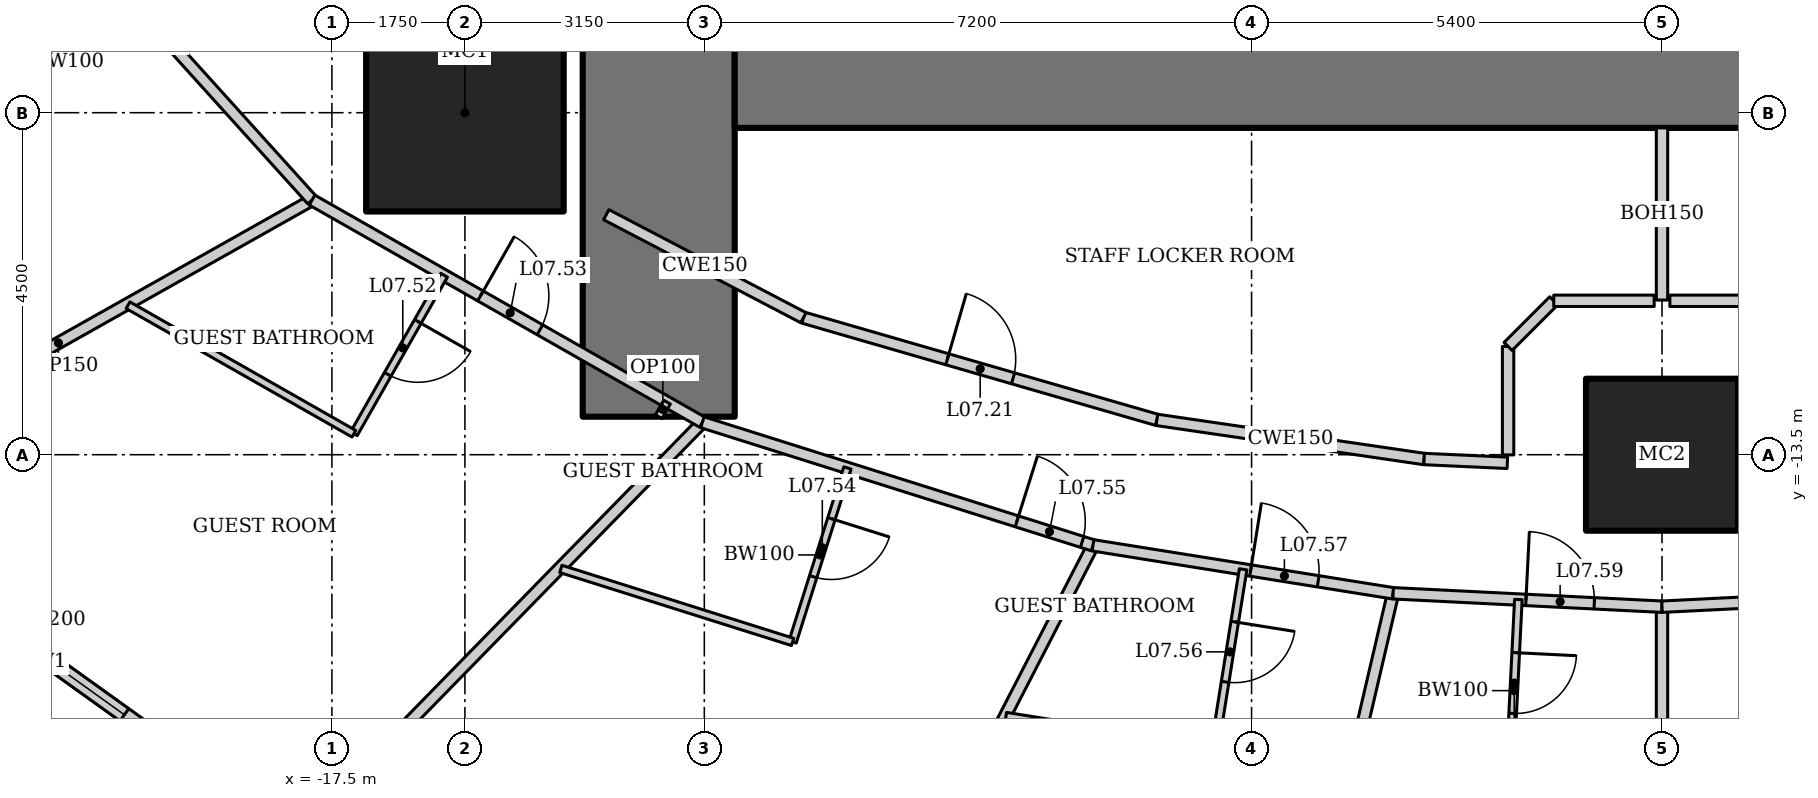
"""IFC4 building model, lengths in metres.
Left out: names, types, materials, properties, quantities, classifications, styles, units other than length and angle.
Written with IfcOpenShell. Run it as: python <this file> out.ifc"""

import sys

from ifc_helpers import new_model, si_unit, direction, frame, frame_2d, origin, origin_2d, place, context, subcontext, project, spatial, rectangle, hollow_rectangle, extrude, element, fill, save


model = new_model("IFC4")
c1 = context("Model", 3, precision=1e-05, world=origin(), true_north=direction((0.0, 1.0)))
c2 = subcontext(c1, "Body", "Model", "MODEL_VIEW")
j1 = project(units=[si_unit("LENGTHUNIT", "METRE"), si_unit("PLANEANGLEUNIT", "RADIAN")], contexts=[c1])
p1 = place(None, origin())
s1 = spatial("IfcSite", under=j1, at=p1, CompositionType="ELEMENT")
p2 = place(p1, origin())
s2 = spatial("IfcBuilding", under=s1, at=p2, CompositionType="ELEMENT")
p3 = place(p2, frame((0.0, 0.0, 40.6)))
s3 = spatial("IfcBuildingStorey", under=s2, at=p3, CompositionType="ELEMENT", Elevation=40.6)
p4 = place(p3, frame((-15.75, -9.0, 0.0), z_axis=(0.0, 0.0, 1.0), x_axis=(1.0, 0.0, 0.0)))
e1 = element("IfcColumn", 1, at=p4, inside=s3, PredefinedType="COLUMN", context=c2, shape_type="SweptSolid", body=[
    extrude(hollow_rectangle(XDim=2.6, YDim=2.6, WallThickness=0.13, at=origin_2d()), origin(), (0.0, 0.0, 1.0), 3.6),
])
p5 = place(p3, frame((0.0, -13.5, 0.0), z_axis=(0.0, 0.0, 1.0), x_axis=(1.0, 0.0, 0.0)))
e2 = element("IfcColumn", 2, at=p5, inside=s3, PredefinedType="COLUMN", context=c2, shape_type="SweptSolid", body=[
    extrude(hollow_rectangle(XDim=2.0, YDim=2.0, WallThickness=0.17, at=origin_2d()), origin(), (0.0, 0.0, 1.0), 3.6),
])
p6 = place(p3, frame((-13.2, 13.0, 0.0), z_axis=(0.0, 0.0, 1.0), x_axis=(0.0, -1.0, 0.0)))
e3 = element("IfcWall", 3, at=p6, inside=s3, PredefinedType="SHEAR", context=c2, shape_type="SweptSolid", body=[
    extrude(rectangle(XDim=26.0, YDim=2.0, at=frame_2d((13.0, 0.0))), origin(), (0.0, 0.0, 1.0), 3.6),
])
p7 = place(p6, frame((12.1, 0.0, 0.0)))
e4 = element("IfcOpeningElement", 4, at=p7, cuts=e3, PredefinedType="OPENING", context=c2, shape_type="SweptSolid", body=[
    extrude(rectangle(XDim=1.8, YDim=2.1, at=frame_2d((0.9, 1.05))), frame((0.0, 1.01, 0.0), z_axis=(0.0, -1.0, 0.0), x_axis=(1.0, 0.0, 0.0)), (0.0, 0.0, 1.0), 2.02),
])
p8 = place(p3, frame((-12.2, -8.0, 0.0), z_axis=(0.0, 0.0, 1.0), x_axis=(1.0, 0.0, 0.0)))
e5 = element("IfcWall", 5, at=p8, inside=s3, PredefinedType="SHEAR", context=c2, shape_type="SweptSolid", body=[
    extrude(rectangle(XDim=24.4, YDim=2.4, at=frame_2d((12.2, 0.0))), origin(), (0.0, 0.0, 1.0), 3.6),
])
p9 = place(p3, frame((-24.482, -13.875, 0.0), z_axis=(0.0, 0.0, 1.0), x_axis=(0.812791321576, -0.582554948112, 0.0)))
e6 = element("IfcWall", 6, at=p9, inside=s3, PredefinedType="SOLIDWALL", context=c2, shape_type="SweptSolid", body=[
    extrude(rectangle(XDim=8.063, YDim=0.2, at=frame_2d((4.032, 0.0))), origin(), (0.0, 0.0, 1.0), 3.45),
])
p10 = place(p9, frame((2.832, 0.0, 0.5)))
e7 = element("IfcOpeningElement", 7, at=p10, cuts=e6, PredefinedType="OPENING", context=c2, shape_type="SweptSolid", body=[
    extrude(rectangle(XDim=2.4, YDim=2.2, at=frame_2d((1.2, 1.1))), frame((0.0, 0.11, 0.0), z_axis=(0.0, -1.0, 0.0), x_axis=(1.0, 0.0, 0.0)), (0.0, 0.0, 1.0), 0.22),
])
p11 = place(p3, frame((-24.435, -13.909, 0.0), z_axis=(0.0, 0.0, 1.0), x_axis=(0.871267209855, 0.490808974074, 0.0)))
e8 = element("IfcWall", 8, at=p11, inside=s3, PredefinedType="PARTITIONING", context=c2, shape_type="SweptSolid", body=[
    extrude(rectangle(XDim=7.659, YDim=0.15, at=frame_2d((3.83, 0.0))), origin(), (0.0, 0.0, 1.0), 2.693),
])
p12 = place(p3, frame((-17.97, -18.542, 0.0), z_axis=(0.0, 0.0, 1.0), x_axis=(0.699032031211, 0.715090357467, 0.0)))
e9 = element("IfcWall", 9, at=p12, inside=s3, PredefinedType="PARTITIONING", context=c2, shape_type="SweptSolid", body=[
    extrude(rectangle(XDim=7.647, YDim=0.15, at=frame_2d((3.824, 0.0))), origin(), (0.0, 0.0, 1.0), 2.528),
])
p13 = place(p3, frame((-10.912, -21.346, 0.0), z_axis=(0.0, 0.0, 1.0), x_axis=(0.45777845119, 0.889066302154, 0.0)))
e10 = element("IfcWall", 10, at=p13, inside=s3, PredefinedType="PARTITIONING", context=c2, shape_type="SweptSolid", body=[
    extrude(rectangle(XDim=7.483, YDim=0.15, at=frame_2d((3.742, 0.0))), origin(), (0.0, 0.0, 1.0), 2.528),
])
p14 = place(p3, frame((-5.211, -22.496, 0.0), z_axis=(0.0, 0.0, 1.0), x_axis=(0.227195035564, 0.973849277771, 0.0)))
e11 = element("IfcWall", 11, at=p14, inside=s3, PredefinedType="PARTITIONING", context=c2, shape_type="SweptSolid", body=[
    extrude(rectangle(XDim=7.365, YDim=0.15, at=frame_2d((3.683, 0.0))), origin(), (0.0, 0.0, 1.0), 2.767),
])
p15 = place(p3, frame((0.0, -22.825, 0.0), z_axis=(0.0, 0.0, 1.0), x_axis=(0.0, 1.0, 0.0)))
e12 = element("IfcWall", 12, at=p15, inside=s3, PredefinedType="PARTITIONING", context=c2, shape_type="SweptSolid", body=[
    extrude(rectangle(XDim=7.325, YDim=0.15, at=frame_2d((3.662, 0.0))), origin(), (0.0, 0.0, 1.0), 2.924),
])
p16 = place(p3, frame((-21.982, -5.481, 0.0), z_axis=(0.0, 0.0, 1.0), x_axis=(0.670598380282, -0.741820606591, 0.0)))
e13 = element("IfcWall", 13, at=p16, inside=s3, PredefinedType="PARTITIONING", context=c2, shape_type="SweptSolid", body=[
    extrude(rectangle(XDim=6.293, YDim=0.15, at=frame_2d((3.147, 0.0))), origin(), (0.0, 0.0, 1.0), 3.45),
])
p17 = place(p16, frame((2.1, 0.0, 0.0)))
e14 = element("IfcOpeningElement", 14, at=p17, cuts=e13, PredefinedType="OPENING", context=c2, shape_type="SweptSolid", body=[
    extrude(rectangle(XDim=0.9, YDim=2.1, at=frame_2d((0.45, 1.05))), frame((0.0, 0.085, 0.0), z_axis=(0.0, -1.0, 0.0), x_axis=(1.0, 0.0, 0.0)), (0.0, 0.0, 1.0), 0.17),
])
p18 = place(p3, frame((-17.761, -10.149, 0.0), z_axis=(0.0, 0.0, 1.0), x_axis=(0.86907565943, -0.494679187136, 0.0)))
e15 = element("IfcWall", 15, at=p18, inside=s3, PredefinedType="PARTITIONING", context=c2, shape_type="SweptSolid", body=[
    extrude(rectangle(XDim=5.911, YDim=0.15, at=frame_2d((2.955, 0.0))), origin(), (0.0, 0.0, 1.0), 3.45),
])
p19 = place(p18, frame((2.55, 0.0, 0.0)))
e16 = element("IfcOpeningElement", 16, at=p19, cuts=e15, PredefinedType="OPENING", context=c2, shape_type="SweptSolid", body=[
    extrude(rectangle(XDim=0.9, YDim=2.1, at=frame_2d((0.45, 1.05))), frame((0.0, 0.085, 0.0), z_axis=(0.0, -1.0, 0.0), x_axis=(1.0, 0.0, 0.0)), (0.0, 0.0, 1.0), 0.17),
])
p20 = place(p3, frame((-12.625, -13.073, 0.0), z_axis=(0.0, 0.0, 1.0), x_axis=(0.953774229808, -0.30052407317, 0.0)))
e17 = element("IfcWall", 17, at=p20, inside=s3, PredefinedType="PARTITIONING", context=c2, shape_type="SweptSolid", body=[
    extrude(rectangle(XDim=5.388, YDim=0.15, at=frame_2d((2.694, 0.0))), origin(), (0.0, 0.0, 1.0), 3.45),
])
p21 = place(p20, frame((4.338, 0.0, 0.0)))
e18 = element("IfcOpeningElement", 18, at=p21, cuts=e17, PredefinedType="OPENING", context=c2, shape_type="SweptSolid", body=[
    extrude(rectangle(XDim=0.9, YDim=2.1, at=frame_2d((0.45, 1.05))), frame((0.0, 0.085, 0.0), z_axis=(0.0, -1.0, 0.0), x_axis=(1.0, 0.0, 0.0)), (0.0, 0.0, 1.0), 0.17),
])
p22 = place(p3, frame((-7.486, -14.692, 0.0), z_axis=(0.0, 0.0, 1.0), x_axis=(0.987475660646, -0.157771415761, 0.0)))
e19 = element("IfcWall", 19, at=p22, inside=s3, PredefinedType="PARTITIONING", context=c2, shape_type="SweptSolid", body=[
    extrude(rectangle(XDim=3.999, YDim=0.15, at=frame_2d((1.999, 0.0))), origin(), (0.0, 0.0, 1.0), 3.45),
])
p23 = place(p22, frame((2.1, 0.0, 0.0)))
e20 = element("IfcOpeningElement", 20, at=p23, cuts=e19, PredefinedType="OPENING", context=c2, shape_type="SweptSolid", body=[
    extrude(rectangle(XDim=0.9, YDim=2.1, at=frame_2d((0.45, 1.05))), frame((0.0, 0.085, 0.0), z_axis=(0.0, -1.0, 0.0), x_axis=(1.0, 0.0, 0.0)), (0.0, 0.0, 1.0), 0.17),
])
p24 = place(p3, frame((-3.538, -15.323, 0.0), z_axis=(0.0, 0.0, 1.0), x_axis=(0.998754057167, -0.049903239295, 0.0)))
e21 = element("IfcWall", 21, at=p24, inside=s3, PredefinedType="PARTITIONING", context=c2, shape_type="SweptSolid", body=[
    extrude(rectangle(XDim=3.542, YDim=0.15, at=frame_2d((1.771, 0.0))), origin(), (0.0, 0.0, 1.0), 3.45),
])
p25 = place(p24, frame((1.75, 0.0, 0.0)))
e22 = element("IfcOpeningElement", 22, at=p25, cuts=e21, PredefinedType="OPENING", context=c2, shape_type="SweptSolid", body=[
    extrude(rectangle(XDim=0.9, YDim=2.1, at=frame_2d((0.45, 1.05))), frame((0.0, 0.085, 0.0), z_axis=(0.0, -1.0, 0.0), x_axis=(1.0, 0.0, 0.0)), (0.0, 0.0, 1.0), 0.17),
])
p26 = place(p3, frame((0.0, -15.5, 0.0), z_axis=(0.0, 0.0, 1.0), x_axis=(0.998754057167, 0.049903239295, 0.0)))
e23 = element("IfcWall", 23, at=p26, inside=s3, PredefinedType="PARTITIONING", context=c2, shape_type="SweptSolid", body=[
    extrude(rectangle(XDim=3.542, YDim=0.15, at=frame_2d((1.771, 0.0))), origin(), (0.0, 0.0, 1.0), 3.45),
])
p27 = place(p26, frame((2.392, 0.0, 0.0)))
e24 = element("IfcOpeningElement", 24, at=p27, cuts=e23, PredefinedType="OPENING", context=c2, shape_type="SweptSolid", body=[
    extrude(rectangle(XDim=1.0, YDim=2.1, at=frame_2d((0.5, 1.05))), frame((0.0, 0.085, 0.0), z_axis=(0.0, -1.0, 0.0), x_axis=(1.0, 0.0, 0.0)), (0.0, 0.0, 1.0), 0.17),
])
p28 = place(p3, frame((-11.296, -11.698, 0.0), z_axis=(0.0, 0.0, 1.0), x_axis=(0.960678318068, -0.277663770041, 0.0)))
e25 = element("IfcWall", 25, at=p28, inside=s3, PredefinedType="PARTITIONING", context=c2, shape_type="SweptSolid", body=[
    extrude(rectangle(XDim=4.841, YDim=0.15, at=frame_2d((2.421, 0.0))), origin(), (0.0, 0.0, 1.0), 3.45),
])
p29 = place(p28, frame((1.971, 0.0, 0.0)))
e26 = element("IfcOpeningElement", 26, at=p29, cuts=e25, PredefinedType="OPENING", context=c2, shape_type="SweptSolid", body=[
    extrude(rectangle(XDim=0.9, YDim=2.1, at=frame_2d((0.45, 1.05))), frame((0.0, 0.085, 0.0), z_axis=(0.0, -1.0, 0.0), x_axis=(1.0, 0.0, 0.0)), (0.0, 0.0, 1.0), 0.17),
])
p30 = place(p3, frame((-6.645, -13.042, 0.0), z_axis=(0.0, 0.0, 1.0), x_axis=(0.989443047021, -0.14492224364, 0.0)))
e27 = element("IfcWall", 27, at=p30, inside=s3, PredefinedType="PARTITIONING", context=c2, shape_type="SweptSolid", body=[
    extrude(rectangle(XDim=3.553, YDim=0.15, at=frame_2d((1.776, 0.0))), origin(), (0.0, 0.0, 1.0), 3.45),
])
p31 = place(p3, frame((-20.641, -6.964, 0.0), z_axis=(0.0, 0.0, 1.0), x_axis=(-0.741861025859, -0.670553665496, 0.0)))
e28 = element("IfcWall", 28, at=p31, inside=s3, PredefinedType="PARTITIONING", context=c2, shape_type="SweptSolid", body=[
    extrude(rectangle(XDim=2.4, YDim=0.1, at=frame_2d((1.2, 0.0))), origin(), (0.0, 0.0, 1.0), 3.45),
])
p32 = place(p31, frame((0.7, 0.0, 0.0)))
e29 = element("IfcOpeningElement", 29, at=p32, cuts=e28, PredefinedType="OPENING", context=c2, shape_type="SweptSolid", body=[
    extrude(rectangle(XDim=0.8, YDim=2.1, at=frame_2d((0.4, 1.05))), frame((0.0, 0.06, 0.0), z_axis=(0.0, -1.0, 0.0), x_axis=(1.0, 0.0, 0.0)), (0.0, 0.0, 1.0), 0.12),
])
p33 = place(p3, frame((-16.023, -11.139, 0.0), z_axis=(0.0, 0.0, 1.0), x_axis=(-0.494659381266, -0.869086932663, 0.0)))
e30 = element("IfcWall", 30, at=p33, inside=s3, PredefinedType="PARTITIONING", context=c2, shape_type="SweptSolid", body=[
    extrude(rectangle(XDim=2.4, YDim=0.1, at=frame_2d((1.2, 0.0))), origin(), (0.0, 0.0, 1.0), 3.45),
])
p34 = place(p33, frame((0.7, 0.0, 0.0)))
e31 = element("IfcOpeningElement", 31, at=p34, cuts=e30, PredefinedType="OPENING", context=c2, shape_type="SweptSolid", body=[
    extrude(rectangle(XDim=0.8, YDim=2.1, at=frame_2d((0.4, 1.05))), frame((0.0, 0.06, 0.0), z_axis=(0.0, -1.0, 0.0), x_axis=(1.0, 0.0, 0.0)), (0.0, 0.0, 1.0), 0.12),
])
p35 = place(p3, frame((-17.21, -13.225, 0.0), z_axis=(0.0, 0.0, 1.0), x_axis=(-0.869041592831, 0.494739032147, 0.0)))
e32 = element("IfcWall", 32, at=p35, inside=s3, PredefinedType="PARTITIONING", context=c2, shape_type="SweptSolid", body=[
    extrude(rectangle(XDim=3.42, YDim=0.1, at=frame_2d((1.71, 0.0))), origin(), (0.0, 0.0, 1.0), 3.45),
])
p36 = place(p3, frame((-10.717, -13.674, 0.0), z_axis=(0.0, 0.0, 1.0), x_axis=(-0.30049839721, -0.953782319649, 0.0)))
e33 = element("IfcWall", 33, at=p36, inside=s3, PredefinedType="PARTITIONING", context=c2, shape_type="SweptSolid", body=[
    extrude(rectangle(XDim=2.4, YDim=0.1, at=frame_2d((1.2, 0.0))), origin(), (0.0, 0.0, 1.0), 3.45),
])
p37 = place(p36, frame((0.7, 0.0, 0.0)))
e34 = element("IfcOpeningElement", 34, at=p37, cuts=e33, PredefinedType="OPENING", context=c2, shape_type="SweptSolid", body=[
    extrude(rectangle(XDim=0.8, YDim=2.1, at=frame_2d((0.4, 1.05))), frame((0.0, 0.06, 0.0), z_axis=(0.0, -1.0, 0.0), x_axis=(1.0, 0.0, 0.0)), (0.0, 0.0, 1.0), 0.12),
])
p38 = place(p3, frame((-11.438, -15.963, 0.0), z_axis=(0.0, 0.0, 1.0), x_axis=(-0.953784420519, 0.300491728963, 0.0)))
e35 = element("IfcWall", 35, at=p38, inside=s3, PredefinedType="PARTITIONING", context=c2, shape_type="SweptSolid", body=[
    extrude(rectangle(XDim=3.197, YDim=0.1, at=frame_2d((1.599, 0.0))), origin(), (0.0, 0.0, 1.0), 3.45),
])
p39 = place(p3, frame((-5.511, -15.008, 0.0), z_axis=(0.0, 0.0, 1.0), x_axis=(-0.157780217218, -0.987474254376, 0.0)))
e36 = element("IfcWall", 36, at=p39, inside=s3, PredefinedType="PARTITIONING", context=c2, shape_type="SweptSolid", body=[
    extrude(rectangle(XDim=2.4, YDim=0.1, at=frame_2d((1.2, 0.0))), origin(), (0.0, 0.0, 1.0), 3.45),
])
p40 = place(p39, frame((0.7, 0.0, 0.0)))
e37 = element("IfcOpeningElement", 37, at=p40, cuts=e36, PredefinedType="OPENING", context=c2, shape_type="SweptSolid", body=[
    extrude(rectangle(XDim=0.8, YDim=2.1, at=frame_2d((0.4, 1.05))), frame((0.0, 0.06, 0.0), z_axis=(0.0, -1.0, 0.0), x_axis=(1.0, 0.0, 0.0)), (0.0, 0.0, 1.0), 0.12),
])
p41 = place(p3, frame((-5.89, -17.378, 0.0), z_axis=(0.0, 0.0, 1.0), x_axis=(-0.987476824576, 0.15776413067, 0.0)))
e38 = element("IfcWall", 38, at=p41, inside=s3, PredefinedType="PARTITIONING", context=c2, shape_type="SweptSolid", body=[
    extrude(rectangle(XDim=2.776, YDim=0.1, at=frame_2d((1.388, 0.0))), origin(), (0.0, 0.0, 1.0), 3.45),
])
p42 = place(p3, frame((-1.89, -15.406, 0.0), z_axis=(0.0, 0.0, 1.0), x_axis=(-0.049947764234, -0.998751831462, 0.0)))
e39 = element("IfcWall", 39, at=p42, inside=s3, PredefinedType="PARTITIONING", context=c2, shape_type="SweptSolid", body=[
    extrude(rectangle(XDim=2.4, YDim=0.1, at=frame_2d((1.2, 0.0))), origin(), (0.0, 0.0, 1.0), 2.749),
])
p43 = place(p42, frame((0.7, 0.0, 0.0)))
e40 = element("IfcOpeningElement", 40, at=p43, cuts=e39, PredefinedType="OPENING", context=c2, shape_type="SweptSolid", body=[
    extrude(rectangle(XDim=0.8, YDim=2.1, at=frame_2d((0.4, 1.05))), frame((0.0, 0.06, 0.0), z_axis=(0.0, -1.0, 0.0), x_axis=(1.0, 0.0, 0.0)), (0.0, 0.0, 1.0), 0.12),
])
p44 = place(p3, frame((-13.2, -13.0, 0.0), z_axis=(0.0, 0.0, 1.0), x_axis=(0.49435138335, 0.869262164011, 0.0)))
e41 = element("IfcWall", 41, at=p44, inside=s3, PredefinedType="PARTITIONING", context=c2, shape_type="SweptSolid", body=[
    extrude(rectangle(XDim=0.221, YDim=0.1, at=frame_2d((0.11, 0.0))), origin(), (0.0, 0.0, 1.0), 3.45),
])
p45 = place(p3, frame((-13.89, -10.342, 0.0), z_axis=(0.0, 0.0, 1.0), x_axis=(0.886275255135, -0.463158905922, 0.0)))
e42 = element("IfcWall", 42, at=p45, inside=s3, PredefinedType="PARTITIONING", context=c2, shape_type="SweptSolid", body=[
    extrude(rectangle(XDim=2.927, YDim=0.15, at=frame_2d((1.463, 0.0))), origin(), (0.0, 0.0, 1.0), 3.45),
])
p46 = place(p3, frame((-3.13, -13.557, 0.0), z_axis=(0.0, 0.0, 1.0), x_axis=(0.998946843147, -0.045882508292, 0.0)))
e43 = element("IfcWall", 43, at=p46, inside=s3, PredefinedType="PARTITIONING", context=c2, shape_type="SweptSolid", body=[
    extrude(rectangle(XDim=1.096, YDim=0.15, at=frame_2d((0.548, 0.0))), origin(), (0.0, 0.0, 1.0), 3.45),
])
p47 = place(p3, frame((0.0, -9.2, 0.0), z_axis=(0.0, 0.0, 1.0), x_axis=(0.0, -1.0, 0.0)))
e44 = element("IfcWall", 44, at=p47, inside=s3, PredefinedType="PARTITIONING", context=c2, shape_type="SweptSolid", body=[
    extrude(rectangle(XDim=2.265, YDim=0.15, at=frame_2d((1.133, 0.0))), origin(), (0.0, 0.0, 1.0), 3.043),
])
p48 = place(p3, frame((-2.025, -13.503, 0.0), z_axis=(0.0, 0.0, 1.0), x_axis=(0.0, 1.0, 0.0)))
e45 = element("IfcWall", 45, at=p48, inside=s3, PredefinedType="PARTITIONING", context=c2, shape_type="SweptSolid", body=[
    extrude(rectangle(XDim=1.427, YDim=0.15, at=frame_2d((0.714, 0.0))), origin(), (0.0, 0.0, 1.0), 2.749),
])
p49 = place(p3, frame((-2.025, -12.075, 0.0), z_axis=(0.0, 0.0, 1.0), x_axis=(0.707106781187, 0.707106781187, 0.0)))
e46 = element("IfcWall", 46, at=p49, inside=s3, PredefinedType="PARTITIONING", context=c2, shape_type="SweptSolid", body=[
    extrude(rectangle(XDim=0.849, YDim=0.15, at=frame_2d((0.425, 0.0))), origin(), (0.0, 0.0, 1.0), 3.45),
])
for number, where, z_axis, x_axis in (
    (47, (-1.425, -11.475, 0.0), (0.0, 0.0, 1.0), (1.0, 0.0, 0.0)),
    (48, (0.103, -11.475, 0.0), (0.0, 0.0, 1.0), (1.0, 0.0, 0.0)),
):
    element("IfcWall", number, at=place(p3, frame(where, z_axis=z_axis, x_axis=x_axis)), inside=s3, PredefinedType="PARTITIONING", context=c2, shape_type="SweptSolid", body=[
        extrude(rectangle(XDim=1.321, YDim=0.15, at=frame_2d((0.661, 0.0))), origin(), (0.0, 0.0, 1.0), 3.45),
    ])
p50 = place(p10, origin())
e49 = element("IfcWindow", 49, at=p50, inside=s3, PartitioningType="SINGLE_PANEL", PredefinedType="WINDOW", context=c2, shape_type="SweptSolid", body=[
    extrude(rectangle(XDim=2.4, YDim=2.2, at=frame_2d((1.2, 1.1))), frame((0.0, 0.03, 0.0), z_axis=(0.0, -1.0, 0.0), x_axis=(1.0, 0.0, 0.0)), (0.0, 0.0, 1.0), 0.06),
])
fill(e7, e49)
p51 = place(p29, origin())
e50 = element("IfcDoor", 50, at=p51, inside=s3, OperationType="SINGLE_SWING_LEFT", PredefinedType="DOOR", context=c2, shape_type="SweptSolid", body=[
    extrude(rectangle(XDim=0.9, YDim=2.1, at=frame_2d((0.45, 1.05))), frame((0.0, 0.025, 0.0), z_axis=(0.0, -1.0, 0.0), x_axis=(1.0, 0.0, 0.0)), (0.0, 0.0, 1.0), 0.05),
])
fill(e26, e50)
p52 = place(p34, origin())
e51 = element("IfcDoor", 51, at=p52, inside=s3, OperationType="SINGLE_SWING_LEFT", PredefinedType="DOOR", context=c2, shape_type="SweptSolid", body=[
    extrude(rectangle(XDim=0.8, YDim=2.1, at=frame_2d((0.4, 1.05))), frame((0.0, 0.025, 0.0), z_axis=(0.0, -1.0, 0.0), x_axis=(1.0, 0.0, 0.0)), (0.0, 0.0, 1.0), 0.05),
])
fill(e31, e51)
p53 = place(p19, origin())
e52 = element("IfcDoor", 52, at=p53, inside=s3, OperationType="SINGLE_SWING_LEFT", PredefinedType="DOOR", context=c2, shape_type="SweptSolid", body=[
    extrude(rectangle(XDim=0.9, YDim=2.1, at=frame_2d((0.45, 1.05))), frame((0.0, 0.025, 0.0), z_axis=(0.0, -1.0, 0.0), x_axis=(1.0, 0.0, 0.0)), (0.0, 0.0, 1.0), 0.05),
])
fill(e16, e52)
p54 = place(p37, origin())
e53 = element("IfcDoor", 53, at=p54, inside=s3, OperationType="SINGLE_SWING_LEFT", PredefinedType="DOOR", context=c2, shape_type="SweptSolid", body=[
    extrude(rectangle(XDim=0.8, YDim=2.1, at=frame_2d((0.4, 1.05))), frame((0.0, 0.025, 0.0), z_axis=(0.0, -1.0, 0.0), x_axis=(1.0, 0.0, 0.0)), (0.0, 0.0, 1.0), 0.05),
])
fill(e34, e53)
p55 = place(p21, origin())
e54 = element("IfcDoor", 54, at=p55, inside=s3, OperationType="SINGLE_SWING_LEFT", PredefinedType="DOOR", context=c2, shape_type="SweptSolid", body=[
    extrude(rectangle(XDim=0.9, YDim=2.1, at=frame_2d((0.45, 1.05))), frame((0.0, 0.025, 0.0), z_axis=(0.0, -1.0, 0.0), x_axis=(1.0, 0.0, 0.0)), (0.0, 0.0, 1.0), 0.05),
])
fill(e18, e54)
p56 = place(p40, origin())
e55 = element("IfcDoor", 55, at=p56, inside=s3, OperationType="SINGLE_SWING_LEFT", PredefinedType="DOOR", context=c2, shape_type="SweptSolid", body=[
    extrude(rectangle(XDim=0.8, YDim=2.1, at=frame_2d((0.4, 1.05))), frame((0.0, 0.025, 0.0), z_axis=(0.0, -1.0, 0.0), x_axis=(1.0, 0.0, 0.0)), (0.0, 0.0, 1.0), 0.05),
])
fill(e37, e55)
p57 = place(p23, origin())
e56 = element("IfcDoor", 56, at=p57, inside=s3, OperationType="SINGLE_SWING_LEFT", PredefinedType="DOOR", context=c2, shape_type="SweptSolid", body=[
    extrude(rectangle(XDim=0.9, YDim=2.1, at=frame_2d((0.45, 1.05))), frame((0.0, 0.025, 0.0), z_axis=(0.0, -1.0, 0.0), x_axis=(1.0, 0.0, 0.0)), (0.0, 0.0, 1.0), 0.05),
])
fill(e20, e56)
p58 = place(p43, origin())
e57 = element("IfcDoor", 57, at=p58, inside=s3, OperationType="SINGLE_SWING_LEFT", PredefinedType="DOOR", context=c2, shape_type="SweptSolid", body=[
    extrude(rectangle(XDim=0.8, YDim=2.1, at=frame_2d((0.4, 1.05))), frame((0.0, 0.025, 0.0), z_axis=(0.0, -1.0, 0.0), x_axis=(1.0, 0.0, 0.0)), (0.0, 0.0, 1.0), 0.05),
])
fill(e40, e57)
p59 = place(p25, origin())
e58 = element("IfcDoor", 58, at=p59, inside=s3, OperationType="SINGLE_SWING_LEFT", PredefinedType="DOOR", context=c2, shape_type="SweptSolid", body=[
    extrude(rectangle(XDim=0.9, YDim=2.1, at=frame_2d((0.45, 1.05))), frame((0.0, 0.025, 0.0), z_axis=(0.0, -1.0, 0.0), x_axis=(1.0, 0.0, 0.0)), (0.0, 0.0, 1.0), 0.05),
])
fill(e22, e58)
save(model, sys.argv[1])
